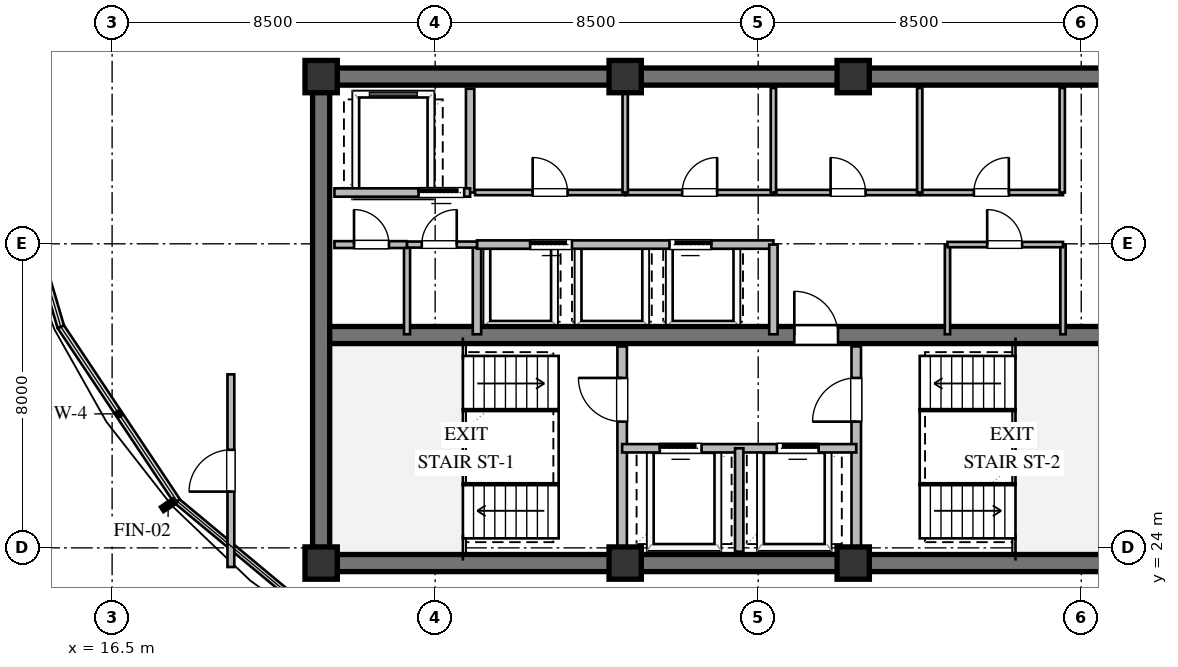
"""IFC4 building model, lengths in metres.
Left out: names, types, materials, properties, quantities, classifications, styles, units other than length and angle.
Written with IfcOpenShell. Run it as: python <this file> out.ifc"""

import sys

from ifc_helpers import new_model, si_unit, direction, frame, frame_2d, origin, origin_2d, place, context, subcontext, project, spatial, rectangle, extrude, element, fill, save


model = new_model("IFC4")
c1 = context("Model", 3, precision=1e-05, world=origin(), true_north=direction((0.0, 1.0)))
c2 = subcontext(c1, "Body", "Model", "MODEL_VIEW")
j1 = project(units=[si_unit("LENGTHUNIT", "METRE"), si_unit("PLANEANGLEUNIT", "RADIAN")], contexts=[c1])
p1 = place(None, origin())
s1 = spatial("IfcSite", under=j1, at=p1, CompositionType="ELEMENT")
p2 = place(p1, origin())
s2 = spatial("IfcBuilding", under=s1, at=p2, CompositionType="ELEMENT")
p3 = place(p2, frame((0.0, 0.0, 235.2)))
s3 = spatial("IfcBuildingStorey", under=s2, at=p3, CompositionType="ELEMENT", Elevation=235.2)
for number, where, z_axis, x_axis in (
    (1, (21.775, 23.6, 0.0), (0.0, 0.0, 1.0), (1.0, 0.0, 0.0)),
    (2, (21.775, 36.4, 0.0), (0.0, 0.0, 1.0), (1.0, 0.0, 0.0)),
):
    element("IfcWall", number, at=place(p3, frame(where, z_axis=z_axis, x_axis=x_axis)), inside=s3, PredefinedType="SHEAR", context=c2, shape_type="SweptSolid", body=[
        extrude(rectangle(XDim=22.45, YDim=0.45, at=frame_2d((11.225, 0.0))), origin(), (0.0, 0.0, 1.0), 3.36),
    ])
p4 = place(p3, frame((22.0, 23.825, 0.0), z_axis=(0.0, 0.0, 1.0), x_axis=(0.0, 1.0, 0.0)))
e3 = element("IfcWall", 3, at=p4, inside=s3, PredefinedType="SHEAR", context=c2, shape_type="SweptSolid", body=[
    extrude(rectangle(XDim=12.35, YDim=0.45, at=frame_2d((6.175, 0.0))), origin(), (0.0, 0.0, 1.0), 3.36),
])
p5 = place(p3, frame((22.225, 29.6, 0.0), z_axis=(0.0, 0.0, 1.0), x_axis=(1.0, 0.0, 0.0)))
e4 = element("IfcWall", 4, at=p5, inside=s3, PredefinedType="SHEAR", context=c2, shape_type="SweptSolid", body=[
    extrude(rectangle(XDim=21.55, YDim=0.45, at=frame_2d((10.775, 0.0))), origin(), (0.0, 0.0, 1.0), 3.36),
])
p6 = place(p5, frame((12.225, 0.0, 0.0)))
e5 = element("IfcOpeningElement", 5, at=p6, cuts=e4, PredefinedType="OPENING", context=c2, shape_type="SweptSolid", body=[
    extrude(rectangle(XDim=1.15, YDim=2.1, at=frame_2d((0.575, 1.05))), frame((0.0, 0.235, 0.0), z_axis=(0.0, -1.0, 0.0), x_axis=(1.0, 0.0, 0.0)), (0.0, 0.0, 1.0), 0.47),
])
for number, where, z_axis, x_axis in (
    (6, (22.0, 23.6, 0.0), (0.0, 0.0, 1.0), (1.0, 0.0, 0.0)),
    (7, (30.0, 23.6, 0.0), (0.0, 0.0, 1.0), (1.0, 0.0, 0.0)),
    (8, (36.0, 23.6, 0.0), (0.0, 0.0, 1.0), (1.0, 0.0, 0.0)),
    (9, (36.0, 36.4, 0.0), (0.0, 0.0, 1.0), (1.0, 0.0, 0.0)),
    (10, (30.0, 36.4, 0.0), (0.0, 0.0, 1.0), (1.0, 0.0, 0.0)),
    (11, (22.0, 36.4, 0.0), (0.0, 0.0, 1.0), (1.0, 0.0, 0.0)),
):
    element("IfcColumn", number, at=place(p3, frame(where, z_axis=z_axis, x_axis=x_axis)), inside=s3, PredefinedType="COLUMN", context=c2, shape_type="SweptSolid", body=[
        extrude(rectangle(XDim=0.85, YDim=0.85, at=origin_2d()), origin(), (0.0, 0.0, 1.0), 3.6),
    ])
p7 = place(p3, frame((29.92, 23.9, 0.0), z_axis=(0.0, 0.0, 1.0), x_axis=(0.0, 1.0, 0.0)))
e12 = element("IfcWall", 12, at=p7, inside=s3, PredefinedType="SOLIDWALL", context=c2, shape_type="SweptSolid", body=[
    extrude(rectangle(XDim=5.4, YDim=0.25, at=frame_2d((2.7, 0.0))), origin(), (0.0, 0.0, 1.0), 3.36),
])
p8 = place(p7, frame((3.421, 0.0, 0.0)))
e13 = element("IfcOpeningElement", 13, at=p8, cuts=e12, PredefinedType="OPENING", context=c2, shape_type="SweptSolid", body=[
    extrude(rectangle(XDim=1.15, YDim=2.1, at=frame_2d((0.575, 1.05))), frame((0.0, 0.135, 0.0), z_axis=(0.0, -1.0, 0.0), x_axis=(1.0, 0.0, 0.0)), (0.0, 0.0, 1.0), 0.27),
])
p9 = place(p3, frame((36.08, 23.9, 0.0), z_axis=(0.0, 0.0, 1.0), x_axis=(0.0, 1.0, 0.0)))
e14 = element("IfcWall", 14, at=p9, inside=s3, PredefinedType="SOLIDWALL", context=c2, shape_type="SweptSolid", body=[
    extrude(rectangle(XDim=5.4, YDim=0.25, at=frame_2d((2.7, 0.0))), origin(), (0.0, 0.0, 1.0), 3.36),
])
p10 = place(p9, frame((3.421, 0.0, 0.0)))
e15 = element("IfcOpeningElement", 15, at=p10, cuts=e14, PredefinedType="OPENING", context=c2, shape_type="SweptSolid", body=[
    extrude(rectangle(XDim=1.15, YDim=2.1, at=frame_2d((0.575, 1.05))), frame((0.0, 0.135, 0.0), z_axis=(0.0, -1.0, 0.0), x_axis=(1.0, 0.0, 0.0)), (0.0, 0.0, 1.0), 0.27),
])
p11 = place(p3, frame((29.92, 26.62, 0.0), z_axis=(0.0, 0.0, 1.0), x_axis=(1.0, 0.0, 0.0)))
e16 = element("IfcWall", 16, at=p11, inside=s3, PredefinedType="SOLIDWALL", context=c2, shape_type="SweptSolid", body=[
    extrude(rectangle(XDim=6.16, YDim=0.22, at=frame_2d((3.08, 0.0))), origin(), (0.0, 0.0, 1.0), 3.36),
])
p12 = place(p11, frame((0.99, 0.0, 0.0)))
e17 = element("IfcOpeningElement", 17, at=p12, cuts=e16, PredefinedType="OPENING", context=c2, shape_type="SweptSolid", body=[
    extrude(rectangle(XDim=1.1, YDim=2.1, at=frame_2d((0.55, 1.05))), frame((0.0, 0.12, 0.0), z_axis=(0.0, -1.0, 0.0), x_axis=(1.0, 0.0, 0.0)), (0.0, 0.0, 1.0), 0.24),
])
p13 = place(p11, frame((4.07, 0.0, 0.0)))
e18 = element("IfcOpeningElement", 18, at=p13, cuts=e16, PredefinedType="OPENING", context=c2, shape_type="SweptSolid", body=[
    extrude(rectangle(XDim=1.1, YDim=2.1, at=frame_2d((0.55, 1.05))), frame((0.0, 0.12, 0.0), z_axis=(0.0, -1.0, 0.0), x_axis=(1.0, 0.0, 0.0)), (0.0, 0.0, 1.0), 0.24),
])
p14 = place(p3, frame((33.0, 23.9, 0.0), z_axis=(0.0, 0.0, 1.0), x_axis=(0.0, 1.0, 0.0)))
e19 = element("IfcWall", 19, at=p14, inside=s3, PredefinedType="SOLIDWALL", context=c2, shape_type="SweptSolid", body=[
    extrude(rectangle(XDim=2.72, YDim=0.22, at=frame_2d((1.36, 0.0))), origin(), (0.0, 0.0, 1.0), 3.36),
])
p15 = place(p3, frame((25.92, 33.35, 0.0), z_axis=(0.0, 0.0, 1.0), x_axis=(0.0, 1.0, 0.0)))
e20 = element("IfcWall", 20, at=p15, inside=s3, PredefinedType="SOLIDWALL", context=c2, shape_type="SweptSolid", body=[
    extrude(rectangle(XDim=2.73, YDim=0.22, at=frame_2d((1.365, 0.0))), origin(), (0.0, 0.0, 1.0), 3.36),
])
p16 = place(p3, frame((22.35, 33.35, 0.0), z_axis=(0.0, 0.0, 1.0), x_axis=(1.0, 0.0, 0.0)))
e21 = element("IfcWall", 21, at=p16, inside=s3, PredefinedType="SOLIDWALL", context=c2, shape_type="SweptSolid", body=[
    extrude(rectangle(XDim=3.57, YDim=0.22, at=frame_2d((1.785, 0.0))), origin(), (0.0, 0.0, 1.0), 3.36),
])
p17 = place(p16, frame((2.213, 0.0, 0.0)))
e22 = element("IfcOpeningElement", 22, at=p17, cuts=e21, PredefinedType="OPENING", context=c2, shape_type="SweptSolid", body=[
    extrude(rectangle(XDim=1.2, YDim=2.1, at=frame_2d((0.6, 1.05))), frame((0.0, 0.12, 0.0), z_axis=(0.0, -1.0, 0.0), x_axis=(1.0, 0.0, 0.0)), (0.0, 0.0, 1.0), 0.24),
])
p18 = place(p3, frame((26.1, 29.62, 0.0), z_axis=(0.0, 0.0, 1.0), x_axis=(0.0, 1.0, 0.0)))
e23 = element("IfcWall", 23, at=p18, inside=s3, PredefinedType="SOLIDWALL", context=c2, shape_type="SweptSolid", body=[
    extrude(rectangle(XDim=2.36, YDim=0.22, at=frame_2d((1.18, 0.0))), origin(), (0.0, 0.0, 1.0), 3.36),
])
p19 = place(p3, frame((26.1, 31.98, 0.0), z_axis=(0.0, 0.0, 1.0), x_axis=(1.0, 0.0, 0.0)))
e24 = element("IfcWall", 24, at=p19, inside=s3, PredefinedType="SOLIDWALL", context=c2, shape_type="SweptSolid", body=[
    extrude(rectangle(XDim=7.8, YDim=0.22, at=frame_2d((3.9, 0.0))), origin(), (0.0, 0.0, 1.0), 3.36),
])
p20 = place(p19, frame((1.4, 0.0, 0.0)))
e25 = element("IfcOpeningElement", 25, at=p20, cuts=e24, PredefinedType="OPENING", context=c2, shape_type="SweptSolid", body=[
    extrude(rectangle(XDim=1.1, YDim=2.1, at=frame_2d((0.55, 1.05))), frame((0.0, 0.12, 0.0), z_axis=(0.0, -1.0, 0.0), x_axis=(1.0, 0.0, 0.0)), (0.0, 0.0, 1.0), 0.24),
])
p21 = place(p19, frame((5.066, 0.0, 0.0)))
e26 = element("IfcOpeningElement", 26, at=p21, cuts=e24, PredefinedType="OPENING", context=c2, shape_type="SweptSolid", body=[
    extrude(rectangle(XDim=1.1, YDim=2.1, at=frame_2d((0.55, 1.05))), frame((0.0, 0.12, 0.0), z_axis=(0.0, -1.0, 0.0), x_axis=(1.0, 0.0, 0.0)), (0.0, 0.0, 1.0), 0.24),
])
p22 = place(p3, frame((33.9, 29.62, 0.0), z_axis=(0.0, 0.0, 1.0), x_axis=(0.0, 1.0, 0.0)))
e27 = element("IfcWall", 27, at=p22, inside=s3, PredefinedType="SOLIDWALL", context=c2, shape_type="SweptSolid", body=[
    extrude(rectangle(XDim=2.36, YDim=0.22, at=frame_2d((1.18, 0.0))), origin(), (0.0, 0.0, 1.0), 3.36),
])
p23 = place(p3, frame((26.05, 33.35, 0.0), z_axis=(0.0, 0.0, 1.0), x_axis=(1.0, 0.0, 0.0)))
e28 = element("IfcWall", 28, at=p23, inside=s3, PredefinedType="PARTITIONING", context=c2, shape_type="SweptSolid", body=[
    extrude(rectangle(XDim=3.95, YDim=0.14, at=frame_2d((1.975, 0.0))), origin(), (0.0, 0.0, 1.0), 3.36),
])
p24 = place(p23, frame((1.515, 0.0, 0.0)))
e29 = element("IfcOpeningElement", 29, at=p24, cuts=e28, PredefinedType="OPENING", context=c2, shape_type="SweptSolid", body=[
    extrude(rectangle(XDim=0.92, YDim=2.1, at=frame_2d((0.46, 1.05))), frame((0.0, 0.08, 0.0), z_axis=(0.0, -1.0, 0.0), x_axis=(1.0, 0.0, 0.0)), (0.0, 0.0, 1.0), 0.16),
])
p25 = place(p3, frame((30.0, 33.35, 0.0), z_axis=(0.0, 0.0, 1.0), x_axis=(1.0, 0.0, 0.0)))
e30 = element("IfcWall", 30, at=p25, inside=s3, PredefinedType="PARTITIONING", context=c2, shape_type="SweptSolid", body=[
    extrude(rectangle(XDim=3.92, YDim=0.14, at=frame_2d((1.96, 0.0))), origin(), (0.0, 0.0, 1.0), 3.36),
])
p26 = place(p25, frame((1.5, 0.0, 0.0)))
e31 = element("IfcOpeningElement", 31, at=p26, cuts=e30, PredefinedType="OPENING", context=c2, shape_type="SweptSolid", body=[
    extrude(rectangle(XDim=0.92, YDim=2.1, at=frame_2d((0.46, 1.05))), frame((0.0, 0.08, 0.0), z_axis=(0.0, -1.0, 0.0), x_axis=(1.0, 0.0, 0.0)), (0.0, 0.0, 1.0), 0.16),
])
for number, where, z_axis, x_axis in (
    (32, (30.0, 33.35, 0.0), (0.0, 0.0, 1.0), (0.0, 1.0, 0.0)),
    (33, (33.9, 33.35, 0.0), (0.0, 0.0, 1.0), (0.0, 1.0, 0.0)),
):
    element("IfcWall", number, at=place(p3, frame(where, z_axis=z_axis, x_axis=x_axis)), inside=s3, PredefinedType="PARTITIONING", context=c2, shape_type="SweptSolid", body=[
        extrude(rectangle(XDim=2.75, YDim=0.14, at=frame_2d((1.375, 0.0))), origin(), (0.0, 0.0, 1.0), 3.36),
    ])
p27 = place(p3, frame((33.98, 33.35, 0.0), z_axis=(0.0, 0.0, 1.0), x_axis=(1.0, 0.0, 0.0)))
e34 = element("IfcWall", 34, at=p27, inside=s3, PredefinedType="PARTITIONING", context=c2, shape_type="SweptSolid", body=[
    extrude(rectangle(XDim=3.77, YDim=0.14, at=frame_2d((1.885, 0.0))), origin(), (0.0, 0.0, 1.0), 3.36),
])
p28 = place(p27, frame((1.425, 0.0, 0.0)))
e35 = element("IfcOpeningElement", 35, at=p28, cuts=e34, PredefinedType="OPENING", context=c2, shape_type="SweptSolid", body=[
    extrude(rectangle(XDim=0.92, YDim=2.1, at=frame_2d((0.46, 1.05))), frame((0.0, 0.08, 0.0), z_axis=(0.0, -1.0, 0.0), x_axis=(1.0, 0.0, 0.0)), (0.0, 0.0, 1.0), 0.16),
])
p29 = place(p3, frame((37.75, 33.35, 0.0), z_axis=(0.0, 0.0, 1.0), x_axis=(1.0, 0.0, 0.0)))
e36 = element("IfcWall", 36, at=p29, inside=s3, PredefinedType="PARTITIONING", context=c2, shape_type="SweptSolid", body=[
    extrude(rectangle(XDim=3.77, YDim=0.14, at=frame_2d((1.885, 0.0))), origin(), (0.0, 0.0, 1.0), 3.36),
])
p30 = place(p29, frame((1.425, 0.0, 0.0)))
e37 = element("IfcOpeningElement", 37, at=p30, cuts=e36, PredefinedType="OPENING", context=c2, shape_type="SweptSolid", body=[
    extrude(rectangle(XDim=0.92, YDim=2.1, at=frame_2d((0.46, 1.05))), frame((0.0, 0.08, 0.0), z_axis=(0.0, -1.0, 0.0), x_axis=(1.0, 0.0, 0.0)), (0.0, 0.0, 1.0), 0.16),
])
for number, where, z_axis, x_axis in (
    (38, (37.75, 33.35, 0.0), (0.0, 0.0, 1.0), (0.0, 1.0, 0.0)),
    (39, (41.5, 33.35, 0.0), (0.0, 0.0, 1.0), (0.0, 1.0, 0.0)),
):
    element("IfcWall", number, at=place(p3, frame(where, z_axis=z_axis, x_axis=x_axis)), inside=s3, PredefinedType="PARTITIONING", context=c2, shape_type="SweptSolid", body=[
        extrude(rectangle(XDim=2.75, YDim=0.14, at=frame_2d((1.375, 0.0))), origin(), (0.0, 0.0, 1.0), 3.36),
    ])
p31 = place(p3, frame((24.26, 29.62, 0.0), z_axis=(0.0, 0.0, 1.0), x_axis=(0.0, 1.0, 0.0)))
e40 = element("IfcWall", 40, at=p31, inside=s3, PredefinedType="PLUMBINGWALL", context=c2, shape_type="SweptSolid", body=[
    extrude(rectangle(XDim=2.36, YDim=0.16, at=frame_2d((1.18, 0.0))), origin(), (0.0, 0.0, 1.0), 3.36),
])
p32 = place(p3, frame((22.35, 31.98, 0.0), z_axis=(0.0, 0.0, 1.0), x_axis=(1.0, 0.0, 0.0)))
e41 = element("IfcWall", 41, at=p32, inside=s3, PredefinedType="PARTITIONING", context=c2, shape_type="SweptSolid", body=[
    extrude(rectangle(XDim=1.91, YDim=0.18, at=frame_2d((0.955, 0.0))), origin(), (0.0, 0.0, 1.0), 3.36),
])
p33 = place(p32, frame((0.515, 0.0, 0.0)))
e42 = element("IfcOpeningElement", 42, at=p33, cuts=e41, PredefinedType="OPENING", context=c2, shape_type="SweptSolid", body=[
    extrude(rectangle(XDim=0.92, YDim=2.1, at=frame_2d((0.46, 1.05))), frame((0.0, 0.1, 0.0), z_axis=(0.0, -1.0, 0.0), x_axis=(1.0, 0.0, 0.0)), (0.0, 0.0, 1.0), 0.2),
])
p34 = place(p3, frame((24.26, 31.98, 0.0), z_axis=(0.0, 0.0, 1.0), x_axis=(1.0, 0.0, 0.0)))
e43 = element("IfcWall", 43, at=p34, inside=s3, PredefinedType="PLUMBINGWALL", context=c2, shape_type="SweptSolid", body=[
    extrude(rectangle(XDim=1.84, YDim=0.16, at=frame_2d((0.92, 0.0))), origin(), (0.0, 0.0, 1.0), 3.36),
])
p35 = place(p34, frame((0.388, 0.0, 0.0)))
e44 = element("IfcOpeningElement", 44, at=p35, cuts=e43, PredefinedType="OPENING", context=c2, shape_type="SweptSolid", body=[
    extrude(rectangle(XDim=0.92, YDim=2.1, at=frame_2d((0.46, 1.05))), frame((0.0, 0.09, 0.0), z_axis=(0.0, -1.0, 0.0), x_axis=(1.0, 0.0, 0.0)), (0.0, 0.0, 1.0), 0.18),
])
for number, where, z_axis, x_axis in (
    (45, (38.48, 29.62, 0.0), (0.0, 0.0, 1.0), (0.0, 1.0, 0.0)),
    (46, (41.52, 29.62, 0.0), (0.0, 0.0, 1.0), (0.0, 1.0, 0.0)),
):
    element("IfcWall", number, at=place(p3, frame(where, z_axis=z_axis, x_axis=x_axis)), inside=s3, PredefinedType="PARTITIONING", context=c2, shape_type="SweptSolid", body=[
        extrude(rectangle(XDim=2.36, YDim=0.14, at=frame_2d((1.18, 0.0))), origin(), (0.0, 0.0, 1.0), 3.36),
    ])
p36 = place(p3, frame((38.48, 31.98, 0.0), z_axis=(0.0, 0.0, 1.0), x_axis=(1.0, 0.0, 0.0)))
e47 = element("IfcWall", 47, at=p36, inside=s3, PredefinedType="PARTITIONING", context=c2, shape_type="SweptSolid", body=[
    extrude(rectangle(XDim=3.04, YDim=0.14, at=frame_2d((1.52, 0.0))), origin(), (0.0, 0.0, 1.0), 3.36),
])
p37 = place(p36, frame((1.045, 0.0, 0.0)))
e48 = element("IfcOpeningElement", 48, at=p37, cuts=e47, PredefinedType="OPENING", context=c2, shape_type="SweptSolid", body=[
    extrude(rectangle(XDim=0.92, YDim=2.1, at=frame_2d((0.46, 1.05))), frame((0.0, 0.08, 0.0), z_axis=(0.0, -1.0, 0.0), x_axis=(1.0, 0.0, 0.0)), (0.0, 0.0, 1.0), 0.16),
])
p38 = place(p3, frame((19.625, 23.496, 0.0), z_axis=(0.0, 0.0, 1.0), x_axis=(0.0, 1.0, 0.0)))
e49 = element("IfcWall", 49, at=p38, inside=s3, PredefinedType="PARTITIONING", context=c2, shape_type="SweptSolid", body=[
    extrude(rectangle(XDim=5.069, YDim=0.18, at=frame_2d((2.534, 0.0))), origin(), (0.0, 0.0, 1.0), 2.817),
])
p39 = place(p38, frame((1.984, 0.0, 0.0)))
e50 = element("IfcOpeningElement", 50, at=p39, cuts=e49, PredefinedType="OPENING", context=c2, shape_type="SweptSolid", body=[
    extrude(rectangle(XDim=1.1, YDim=2.1, at=frame_2d((0.55, 1.05))), frame((0.0, 0.1, 0.0), z_axis=(0.0, -1.0, 0.0), x_axis=(1.0, 0.0, 0.0)), (0.0, 0.0, 1.0), 0.2),
])
p40 = place(p8, origin())
e51 = element("IfcDoor", 51, at=p40, inside=s3, OperationType="SINGLE_SWING_RIGHT", PredefinedType="DOOR", context=c2, shape_type="SweptSolid", body=[
    extrude(rectangle(XDim=1.15, YDim=2.1, at=frame_2d((0.575, 1.05))), frame((0.0, 0.025, 0.0), z_axis=(0.0, -1.0, 0.0), x_axis=(1.0, 0.0, 0.0)), (0.0, 0.0, 1.0), 0.05),
])
fill(e13, e51)
p41 = place(p10, origin())
e52 = element("IfcDoor", 52, at=p41, inside=s3, OperationType="SINGLE_SWING_LEFT", PredefinedType="DOOR", context=c2, shape_type="SweptSolid", body=[
    extrude(rectangle(XDim=1.15, YDim=2.1, at=frame_2d((0.575, 1.05))), frame((0.0, 0.025, 0.0), z_axis=(0.0, -1.0, 0.0), x_axis=(1.0, 0.0, 0.0)), (0.0, 0.0, 1.0), 0.05),
])
fill(e15, e52)
p42 = place(p12, origin())
e53 = element("IfcDoor", 53, at=p42, inside=s3, OperationType="SLIDING_TO_LEFT", PredefinedType="DOOR", context=c2, shape_type="SweptSolid", body=[
    extrude(rectangle(XDim=1.1, YDim=2.1, at=frame_2d((0.55, 1.05))), frame((0.0, 0.025, 0.0), z_axis=(0.0, -1.0, 0.0), x_axis=(1.0, 0.0, 0.0)), (0.0, 0.0, 1.0), 0.05),
])
fill(e17, e53)
p43 = place(p13, origin())
e54 = element("IfcDoor", 54, at=p43, inside=s3, OperationType="SLIDING_TO_RIGHT", PredefinedType="DOOR", context=c2, shape_type="SweptSolid", body=[
    extrude(rectangle(XDim=1.1, YDim=2.1, at=frame_2d((0.55, 1.05))), frame((0.0, 0.025, 0.0), z_axis=(0.0, -1.0, 0.0), x_axis=(1.0, 0.0, 0.0)), (0.0, 0.0, 1.0), 0.05),
])
fill(e18, e54)
p44 = place(p6, origin())
e55 = element("IfcDoor", 55, at=p44, inside=s3, OperationType="SINGLE_SWING_LEFT", PredefinedType="DOOR", context=c2, shape_type="SweptSolid", body=[
    extrude(rectangle(XDim=1.15, YDim=2.1, at=frame_2d((0.575, 1.05))), frame((0.0, 0.025, 0.0), z_axis=(0.0, -1.0, 0.0), x_axis=(1.0, 0.0, 0.0)), (0.0, 0.0, 1.0), 0.05),
])
fill(e5, e55)
p45 = place(p17, origin())
e56 = element("IfcDoor", 56, at=p45, inside=s3, OperationType="SLIDING_TO_LEFT", PredefinedType="DOOR", context=c2, shape_type="SweptSolid", body=[
    extrude(rectangle(XDim=1.2, YDim=2.1, at=frame_2d((0.6, 1.05))), frame((0.0, 0.025, 0.0), z_axis=(0.0, -1.0, 0.0), x_axis=(1.0, 0.0, 0.0)), (0.0, 0.0, 1.0), 0.05),
])
fill(e22, e56)
p46 = place(p20, origin())
e57 = element("IfcDoor", 57, at=p46, inside=s3, OperationType="SLIDING_TO_LEFT", PredefinedType="DOOR", context=c2, shape_type="SweptSolid", body=[
    extrude(rectangle(XDim=1.1, YDim=2.1, at=frame_2d((0.55, 1.05))), frame((0.0, 0.025, 0.0), z_axis=(0.0, -1.0, 0.0), x_axis=(1.0, 0.0, 0.0)), (0.0, 0.0, 1.0), 0.05),
])
fill(e25, e57)
p47 = place(p21, origin())
e58 = element("IfcDoor", 58, at=p47, inside=s3, OperationType="SLIDING_TO_RIGHT", PredefinedType="DOOR", context=c2, shape_type="SweptSolid", body=[
    extrude(rectangle(XDim=1.1, YDim=2.1, at=frame_2d((0.55, 1.05))), frame((0.0, 0.025, 0.0), z_axis=(0.0, -1.0, 0.0), x_axis=(1.0, 0.0, 0.0)), (0.0, 0.0, 1.0), 0.05),
])
fill(e26, e58)
p48 = place(p24, origin())
e59 = element("IfcDoor", 59, at=p48, inside=s3, OperationType="SINGLE_SWING_LEFT", PredefinedType="DOOR", context=c2, shape_type="SweptSolid", body=[
    extrude(rectangle(XDim=0.92, YDim=2.1, at=frame_2d((0.46, 1.05))), frame((0.0, 0.025, 0.0), z_axis=(0.0, -1.0, 0.0), x_axis=(1.0, 0.0, 0.0)), (0.0, 0.0, 1.0), 0.05),
])
fill(e29, e59)
p49 = place(p26, origin())
e60 = element("IfcDoor", 60, at=p49, inside=s3, OperationType="SINGLE_SWING_RIGHT", PredefinedType="DOOR", context=c2, shape_type="SweptSolid", body=[
    extrude(rectangle(XDim=0.92, YDim=2.1, at=frame_2d((0.46, 1.05))), frame((0.0, 0.025, 0.0), z_axis=(0.0, -1.0, 0.0), x_axis=(1.0, 0.0, 0.0)), (0.0, 0.0, 1.0), 0.05),
])
fill(e31, e60)
p50 = place(p28, origin())
e61 = element("IfcDoor", 61, at=p50, inside=s3, OperationType="SINGLE_SWING_LEFT", PredefinedType="DOOR", context=c2, shape_type="SweptSolid", body=[
    extrude(rectangle(XDim=0.92, YDim=2.1, at=frame_2d((0.46, 1.05))), frame((0.0, 0.025, 0.0), z_axis=(0.0, -1.0, 0.0), x_axis=(1.0, 0.0, 0.0)), (0.0, 0.0, 1.0), 0.05),
])
fill(e35, e61)
p51 = place(p30, origin())
e62 = element("IfcDoor", 62, at=p51, inside=s3, OperationType="SINGLE_SWING_RIGHT", PredefinedType="DOOR", context=c2, shape_type="SweptSolid", body=[
    extrude(rectangle(XDim=0.92, YDim=2.1, at=frame_2d((0.46, 1.05))), frame((0.0, 0.025, 0.0), z_axis=(0.0, -1.0, 0.0), x_axis=(1.0, 0.0, 0.0)), (0.0, 0.0, 1.0), 0.05),
])
fill(e37, e62)
p52 = place(p33, origin())
e63 = element("IfcDoor", 63, at=p52, inside=s3, OperationType="SINGLE_SWING_LEFT", PredefinedType="DOOR", context=c2, shape_type="SweptSolid", body=[
    extrude(rectangle(XDim=0.92, YDim=2.1, at=frame_2d((0.46, 1.05))), frame((0.0, 0.025, 0.0), z_axis=(0.0, -1.0, 0.0), x_axis=(1.0, 0.0, 0.0)), (0.0, 0.0, 1.0), 0.05),
])
fill(e42, e63)
p53 = place(p35, origin())
e64 = element("IfcDoor", 64, at=p53, inside=s3, OperationType="SINGLE_SWING_RIGHT", PredefinedType="DOOR", context=c2, shape_type="SweptSolid", body=[
    extrude(rectangle(XDim=0.92, YDim=2.1, at=frame_2d((0.46, 1.05))), frame((0.0, 0.025, 0.0), z_axis=(0.0, -1.0, 0.0), x_axis=(1.0, 0.0, 0.0)), (0.0, 0.0, 1.0), 0.05),
])
fill(e44, e64)
p54 = place(p37, origin())
e65 = element("IfcDoor", 65, at=p54, inside=s3, OperationType="SINGLE_SWING_LEFT", PredefinedType="DOOR", context=c2, shape_type="SweptSolid", body=[
    extrude(rectangle(XDim=0.92, YDim=2.1, at=frame_2d((0.46, 1.05))), frame((0.0, 0.025, 0.0), z_axis=(0.0, -1.0, 0.0), x_axis=(1.0, 0.0, 0.0)), (0.0, 0.0, 1.0), 0.05),
])
fill(e48, e65)
p55 = place(p39, origin())
e66 = element("IfcDoor", 66, at=p55, inside=s3, OperationType="SINGLE_SWING_LEFT", PredefinedType="DOOR", context=c2, shape_type="SweptSolid", body=[
    extrude(rectangle(XDim=1.1, YDim=2.1, at=frame_2d((0.55, 1.05))), frame((0.0, 0.025, 0.0), z_axis=(0.0, -1.0, 0.0), x_axis=(1.0, 0.0, 0.0)), (0.0, 0.0, 1.0), 0.05),
])
fill(e50, e66)
save(model, sys.argv[1])
